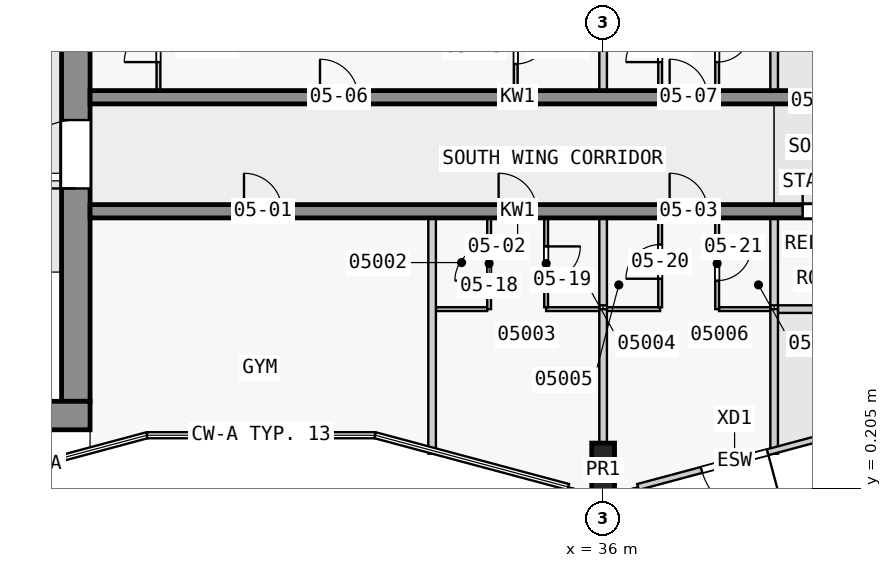
"""IFC4 building model, lengths in metres.
Left out: names, types, materials, properties, quantities, classifications, styles, units other than length and angle.
Written with IfcOpenShell. Run it as: python <this file> out.ifc"""

import sys

from ifc_helpers import new_model, si_unit, direction, frame, frame_2d, origin, origin_2d, place, context, subcontext, project, spatial, rectangle, extrude, element, fill, save


model = new_model("IFC4")
c1 = context("Model", 3, precision=1e-05, world=origin(), true_north=direction((0.0, 1.0)))
c2 = subcontext(c1, "Body", "Model", "MODEL_VIEW")
j1 = project(units=[si_unit("LENGTHUNIT", "METRE"), si_unit("PLANEANGLEUNIT", "RADIAN")], contexts=[c1])
p1 = place(None, origin())
s1 = spatial("IfcSite", under=j1, at=p1, CompositionType="ELEMENT")
p2 = place(p1, origin())
s2 = spatial("IfcBuilding", under=s1, at=p2, CompositionType="ELEMENT")
p3 = place(p2, frame((0.0, 0.0, 26.8)))
s3 = spatial("IfcBuildingStorey", under=s2, at=p3, CompositionType="ELEMENT", Elevation=26.8)
p4 = place(p3, frame((36.0, 0.7, 0.0), z_axis=(0.0, 0.0, 1.0), x_axis=(1.0, 0.0, 0.0)))
e1 = element("IfcColumn", 1, at=p4, inside=s3, PredefinedType="COLUMN", context=c2, shape_type="SweptSolid", body=[
    extrude(rectangle(XDim=0.6, YDim=1.4, at=origin_2d()), origin(), (0.0, 0.0, 1.0), 3.5),
])
p5 = place(p3, frame((1.55, 2.125, 0.0), z_axis=(0.0, 0.0, 1.0), x_axis=(1.0, 0.0, 0.0)))
e2 = element("IfcWall", 2, at=p5, inside=s3, PredefinedType="SHEAR", context=c2, shape_type="SweptSolid", body=[
    extrude(rectangle(XDim=20.95, YDim=0.75, at=frame_2d((10.475, 0.0))), origin(), (0.0, 0.0, 1.0), 3.25),
])
p6 = place(p3, frame((22.125, 2.5, 0.0), z_axis=(0.0, 0.0, 1.0), x_axis=(0.0, 1.0, 0.0)))
e3 = element("IfcWall", 3, at=p6, inside=s3, PredefinedType="SHEAR", context=c2, shape_type="SweptSolid", body=[
    extrude(rectangle(XDim=14.75, YDim=0.75, at=frame_2d((7.375, 0.0))), origin(), (0.0, 0.0, 1.0), 3.25),
])
p7 = place(p6, frame((5.6, 0.0, 0.0)))
e4 = element("IfcOpeningElement", 4, at=p7, cuts=e3, PredefinedType="OPENING", context=c2, shape_type="SweptSolid", body=[
    extrude(rectangle(XDim=1.8, YDim=2.1, at=frame_2d((0.9, 1.05))), frame((0.0, 0.385, 0.0), z_axis=(0.0, -1.0, 0.0), x_axis=(1.0, 0.0, 0.0)), (0.0, 0.0, 1.0), 0.77),
])
p8 = place(p3, frame((22.5, 7.5, 0.0), z_axis=(0.0, 0.0, 1.0), x_axis=(1.0, 0.0, 0.0)))
e5 = element("IfcWall", 5, at=p8, inside=s3, PredefinedType="SHEAR", context=c2, shape_type="SweptSolid", body=[
    extrude(rectangle(XDim=22.5, YDim=0.35, at=frame_2d((11.25, 0.0))), origin(), (0.0, 0.0, 1.0), 3.25),
])
p9 = place(p8, frame((4.05, 0.0, 0.0)))
e6 = element("IfcOpeningElement", 6, at=p9, cuts=e5, PredefinedType="OPENING", context=c2, shape_type="SweptSolid", body=[
    extrude(rectangle(XDim=1.0, YDim=2.1, at=frame_2d((0.5, 1.05))), frame((0.0, 0.185, 0.0), z_axis=(0.0, -1.0, 0.0), x_axis=(1.0, 0.0, 0.0)), (0.0, 0.0, 1.0), 0.37),
])
p10 = place(p8, frame((10.75, 0.0, 0.0)))
e7 = element("IfcOpeningElement", 7, at=p10, cuts=e5, PredefinedType="OPENING", context=c2, shape_type="SweptSolid", body=[
    extrude(rectangle(XDim=1.0, YDim=2.1, at=frame_2d((0.5, 1.05))), frame((0.0, 0.185, 0.0), z_axis=(0.0, -1.0, 0.0), x_axis=(1.0, 0.0, 0.0)), (0.0, 0.0, 1.0), 0.37),
])
p11 = place(p8, frame((15.25, 0.0, 0.0)))
e8 = element("IfcOpeningElement", 8, at=p11, cuts=e5, PredefinedType="OPENING", context=c2, shape_type="SweptSolid", body=[
    extrude(rectangle(XDim=1.0, YDim=2.1, at=frame_2d((0.5, 1.05))), frame((0.0, 0.185, 0.0), z_axis=(0.0, -1.0, 0.0), x_axis=(1.0, 0.0, 0.0)), (0.0, 0.0, 1.0), 0.37),
])
p12 = place(p8, frame((18.75, 0.0, 0.0)))
e9 = element("IfcOpeningElement", 9, at=p12, cuts=e5, PredefinedType="OPENING", context=c2, shape_type="SweptSolid", body=[
    extrude(rectangle(XDim=0.9, YDim=2.1, at=frame_2d((0.45, 1.05))), frame((0.0, 0.185, 0.0), z_axis=(0.0, -1.0, 0.0), x_axis=(1.0, 0.0, 0.0)), (0.0, 0.0, 1.0), 0.37),
])
p13 = place(p8, frame((20.95, 0.0, 0.0)))
e10 = element("IfcOpeningElement", 10, at=p13, cuts=e5, PredefinedType="OPENING", context=c2, shape_type="SweptSolid", body=[
    extrude(rectangle(XDim=1.0, YDim=2.1, at=frame_2d((0.5, 1.05))), frame((0.0, 0.185, 0.0), z_axis=(0.0, -1.0, 0.0), x_axis=(1.0, 0.0, 0.0)), (0.0, 0.0, 1.0), 0.37),
])
p14 = place(p3, frame((22.5, 10.5, 0.0), z_axis=(0.0, 0.0, 1.0), x_axis=(1.0, 0.0, 0.0)))
e11 = element("IfcWall", 11, at=p14, inside=s3, PredefinedType="SHEAR", context=c2, shape_type="SweptSolid", body=[
    extrude(rectangle(XDim=22.5, YDim=0.35, at=frame_2d((11.25, 0.0))), origin(), (0.0, 0.0, 1.0), 3.25),
])
p15 = place(p14, frame((6.05, 0.0, 0.0)))
e12 = element("IfcOpeningElement", 12, at=p15, cuts=e11, PredefinedType="OPENING", context=c2, shape_type="SweptSolid", body=[
    extrude(rectangle(XDim=1.0, YDim=2.1, at=frame_2d((0.5, 1.05))), frame((0.0, 0.185, 0.0), z_axis=(0.0, -1.0, 0.0), x_axis=(1.0, 0.0, 0.0)), (0.0, 0.0, 1.0), 0.37),
])
p16 = place(p14, frame((15.25, 0.0, 0.0)))
e13 = element("IfcOpeningElement", 13, at=p16, cuts=e11, PredefinedType="OPENING", context=c2, shape_type="SweptSolid", body=[
    extrude(rectangle(XDim=1.0, YDim=2.1, at=frame_2d((0.5, 1.05))), frame((0.0, 0.185, 0.0), z_axis=(0.0, -1.0, 0.0), x_axis=(1.0, 0.0, 0.0)), (0.0, 0.0, 1.0), 0.37),
])
p17 = place(p14, frame((19.75, 0.0, 0.0)))
e14 = element("IfcOpeningElement", 14, at=p17, cuts=e11, PredefinedType="OPENING", context=c2, shape_type="SweptSolid", body=[
    extrude(rectangle(XDim=1.0, YDim=2.1, at=frame_2d((0.5, 1.05))), frame((0.0, 0.185, 0.0), z_axis=(0.0, -1.0, 0.0), x_axis=(1.0, 0.0, 0.0)), (0.0, 0.0, 1.0), 0.37),
])
p18 = place(p3, frame((42.0, 1.607, 0.0), z_axis=(0.0, 0.0, 1.0), x_axis=(-0.965956335063, -0.258705157954, 0.0)))
e15 = element("IfcWall", 15, at=p18, inside=s3, PredefinedType="STANDARD", context=c2, shape_type="SweptSolid", body=[
    extrude(rectangle(XDim=5.261, YDim=0.16, at=frame_2d((2.631, 0.0))), origin(), (0.0, 0.0, 1.0), 3.25),
])
p19 = place(p18, frame((1.73, 0.0, 0.0)))
e16 = element("IfcOpeningElement", 16, at=p19, cuts=e15, PredefinedType="OPENING", context=c2, shape_type="SweptSolid", body=[
    extrude(rectangle(XDim=1.8, YDim=2.4, at=frame_2d((0.9, 1.2))), frame((0.0, 0.09, 0.0), z_axis=(0.0, -1.0, 0.0), x_axis=(1.0, 0.0, 0.0)), (0.0, 0.0, 1.0), 0.18),
])
p20 = place(p3, frame((31.6, 4.925, 0.0), z_axis=(0.0, 0.0, 1.0), x_axis=(1.0, 0.0, 0.0)))
e17 = element("IfcWall", 17, at=p20, inside=s3, PredefinedType="PARTITIONING", context=c2, shape_type="SweptSolid", body=[
    extrude(rectangle(XDim=1.35, YDim=0.1, at=frame_2d((0.675, 0.0))), origin(), (0.0, 0.0, 1.0), 3.25),
])
for number, where, z_axis, x_axis in (
    (18, (34.5, 4.925, 0.0), (0.0, 0.0, 1.0), (1.0, 0.0, 0.0)),
    (19, (36.1, 4.925, 0.0), (0.0, 0.0, 1.0), (1.0, 0.0, 0.0)),
):
    element("IfcWall", number, at=place(p3, frame(where, z_axis=z_axis, x_axis=x_axis)), inside=s3, PredefinedType="PARTITIONING", context=c2, shape_type="SweptSolid", body=[
        extrude(rectangle(XDim=1.4, YDim=0.1, at=frame_2d((0.7, 0.0))), origin(), (0.0, 0.0, 1.0), 3.25),
    ])
p21 = place(p3, frame((39.05, 4.925, 0.0), z_axis=(0.0, 0.0, 1.0), x_axis=(1.0, 0.0, 0.0)))
e20 = element("IfcWall", 20, at=p21, inside=s3, PredefinedType="PARTITIONING", context=c2, shape_type="SweptSolid", body=[
    extrude(rectangle(XDim=1.35, YDim=0.1, at=frame_2d((0.675, 0.0))), origin(), (0.0, 0.0, 1.0), 3.25),
])
p22 = place(p3, frame((40.6, 4.925, 0.0), z_axis=(0.0, 0.0, 1.0), x_axis=(1.0, 0.0, 0.0)))
e21 = element("IfcWall", 21, at=p22, inside=s3, PredefinedType="PARTITIONING", context=c2, shape_type="SweptSolid", body=[
    extrude(rectangle(XDim=2.3, YDim=0.2, at=frame_2d((1.15, 0.0))), origin(), (0.0, 0.0, 1.0), 3.25),
])
p23 = place(p3, frame((24.3, 10.675, 0.0), z_axis=(0.0, 0.0, 1.0), x_axis=(0.0, 1.0, 0.0)))
e22 = element("IfcWall", 22, at=p23, inside=s3, PredefinedType="PARTITIONING", context=c2, shape_type="SweptSolid", body=[
    extrude(rectangle(XDim=2.4, YDim=0.1, at=frame_2d((1.2, 0.0))), origin(), (0.0, 0.0, 1.0), 3.25),
])
p24 = place(p23, frame((0.75, 0.0, 0.0)))
e23 = element("IfcOpeningElement", 23, at=p24, cuts=e22, PredefinedType="OPENING", context=c2, shape_type="SweptSolid", body=[
    extrude(rectangle(XDim=0.9, YDim=2.1, at=frame_2d((0.45, 1.05))), frame((0.0, 0.06, 0.0), z_axis=(0.0, -1.0, 0.0), x_axis=(1.0, 0.0, 0.0)), (0.0, 0.0, 1.0), 0.12),
])
p25 = place(p3, frame((31.5, 1.122, 0.0), z_axis=(0.0, 0.0, 1.0), x_axis=(0.0, 1.0, 0.0)))
e24 = element("IfcWall", 24, at=p25, inside=s3, PredefinedType="PARTITIONING", context=c2, shape_type="SweptSolid", body=[
    extrude(rectangle(XDim=6.203, YDim=0.2, at=frame_2d((3.101, 0.0))), origin(), (0.0, 0.0, 1.0), 3.25),
])
p26 = place(p3, frame((33.0, 4.925, 0.0), z_axis=(0.0, 0.0, 1.0), x_axis=(0.0, 1.0, 0.0)))
e25 = element("IfcWall", 25, at=p26, inside=s3, PredefinedType="PARTITIONING", context=c2, shape_type="SweptSolid", body=[
    extrude(rectangle(XDim=2.4, YDim=0.1, at=frame_2d((1.2, 0.0))), origin(), (0.0, 0.0, 1.0), 3.25),
])
p27 = place(p26, frame((0.75, 0.0, 0.0)))
e26 = element("IfcOpeningElement", 26, at=p27, cuts=e25, PredefinedType="OPENING", context=c2, shape_type="SweptSolid", body=[
    extrude(rectangle(XDim=0.9, YDim=2.1, at=frame_2d((0.45, 1.05))), frame((0.0, 0.06, 0.0), z_axis=(0.0, -1.0, 0.0), x_axis=(1.0, 0.0, 0.0)), (0.0, 0.0, 1.0), 0.12),
])
p28 = place(p3, frame((33.7, 13.025, 0.0), z_axis=(0.0, 0.0, 1.0), x_axis=(0.0, -1.0, 0.0)))
e27 = element("IfcWall", 27, at=p28, inside=s3, PredefinedType="PARTITIONING", context=c2, shape_type="SweptSolid", body=[
    extrude(rectangle(XDim=2.35, YDim=0.1, at=frame_2d((1.175, 0.0))), origin(), (0.0, 0.0, 1.0), 3.25),
])
p29 = place(p28, frame((0.75, 0.0, 0.0)))
e28 = element("IfcOpeningElement", 28, at=p29, cuts=e27, PredefinedType="OPENING", context=c2, shape_type="SweptSolid", body=[
    extrude(rectangle(XDim=0.9, YDim=2.1, at=frame_2d((0.45, 1.05))), frame((0.0, 0.06, 0.0), z_axis=(0.0, -1.0, 0.0), x_axis=(1.0, 0.0, 0.0)), (0.0, 0.0, 1.0), 0.12),
])
p30 = place(p3, frame((34.5, 7.325, 0.0), z_axis=(0.0, 0.0, 1.0), x_axis=(0.0, -1.0, 0.0)))
e29 = element("IfcWall", 29, at=p30, inside=s3, PredefinedType="PARTITIONING", context=c2, shape_type="SweptSolid", body=[
    extrude(rectangle(XDim=2.35, YDim=0.1, at=frame_2d((1.175, 0.0))), origin(), (0.0, 0.0, 1.0), 3.25),
])
p31 = place(p30, frame((0.75, 0.0, 0.0)))
e30 = element("IfcOpeningElement", 30, at=p31, cuts=e29, PredefinedType="OPENING", context=c2, shape_type="SweptSolid", body=[
    extrude(rectangle(XDim=0.9, YDim=2.1, at=frame_2d((0.45, 1.05))), frame((0.0, 0.06, 0.0), z_axis=(0.0, -1.0, 0.0), x_axis=(1.0, 0.0, 0.0)), (0.0, 0.0, 1.0), 0.12),
])
p32 = place(p3, frame((36.0, 4.925, 0.0), z_axis=(0.0, 0.0, 1.0), x_axis=(0.0, -1.0, 0.0)))
e31 = element("IfcWall", 31, at=p32, inside=s3, PredefinedType="PARTITIONING", context=c2, shape_type="SweptSolid", body=[
    extrude(rectangle(XDim=3.525, YDim=0.2, at=frame_2d((1.763, 0.0))), origin(), (0.0, 0.0, 1.0), 3.25),
])
p33 = place(p3, frame((36.0, 5.025, 0.0), z_axis=(0.0, 0.0, 1.0), x_axis=(0.0, 1.0, 0.0)))
e32 = element("IfcWall", 32, at=p33, inside=s3, PredefinedType="PARTITIONING", context=c2, shape_type="SweptSolid", body=[
    extrude(rectangle(XDim=2.3, YDim=0.2, at=frame_2d((1.15, 0.0))), origin(), (0.0, 0.0, 1.0), 3.25),
])
p34 = place(p3, frame((36.0, 10.675, 0.0), z_axis=(0.0, 0.0, 1.0), x_axis=(0.0, 1.0, 0.0)))
e33 = element("IfcWall", 33, at=p34, inside=s3, PredefinedType="PARTITIONING", context=c2, shape_type="SweptSolid", body=[
    extrude(rectangle(XDim=5.925, YDim=0.2, at=frame_2d((2.962, 0.0))), origin(), (0.0, 0.0, 1.0), 3.25),
])
p35 = place(p3, frame((37.5, 4.975, 0.0), z_axis=(0.0, 0.0, 1.0), x_axis=(0.0, 1.0, 0.0)))
e34 = element("IfcWall", 34, at=p35, inside=s3, PredefinedType="PARTITIONING", context=c2, shape_type="SweptSolid", body=[
    extrude(rectangle(XDim=2.35, YDim=0.1, at=frame_2d((1.175, 0.0))), origin(), (0.0, 0.0, 1.0), 3.25),
])
p36 = place(p35, frame((0.75, 0.0, 0.0)))
e35 = element("IfcOpeningElement", 35, at=p36, cuts=e34, PredefinedType="OPENING", context=c2, shape_type="SweptSolid", body=[
    extrude(rectangle(XDim=0.9, YDim=2.1, at=frame_2d((0.45, 1.05))), frame((0.0, 0.06, 0.0), z_axis=(0.0, -1.0, 0.0), x_axis=(1.0, 0.0, 0.0)), (0.0, 0.0, 1.0), 0.12),
])
p37 = place(p3, frame((37.5, 10.675, 0.0), z_axis=(0.0, 0.0, 1.0), x_axis=(0.0, 1.0, 0.0)))
e36 = element("IfcWall", 36, at=p37, inside=s3, PredefinedType="PARTITIONING", context=c2, shape_type="SweptSolid", body=[
    extrude(rectangle(XDim=2.35, YDim=0.1, at=frame_2d((1.175, 0.0))), origin(), (0.0, 0.0, 1.0), 3.25),
])
p38 = place(p37, frame((0.75, 0.0, 0.0)))
e37 = element("IfcOpeningElement", 37, at=p38, cuts=e36, PredefinedType="OPENING", context=c2, shape_type="SweptSolid", body=[
    extrude(rectangle(XDim=0.9, YDim=2.1, at=frame_2d((0.45, 1.05))), frame((0.0, 0.06, 0.0), z_axis=(0.0, -1.0, 0.0), x_axis=(1.0, 0.0, 0.0)), (0.0, 0.0, 1.0), 0.12),
])
p39 = place(p3, frame((39.0, 7.325, 0.0), z_axis=(0.0, 0.0, 1.0), x_axis=(0.0, -1.0, 0.0)))
e38 = element("IfcWall", 38, at=p39, inside=s3, PredefinedType="PARTITIONING", context=c2, shape_type="SweptSolid", body=[
    extrude(rectangle(XDim=2.4, YDim=0.1, at=frame_2d((1.2, 0.0))), origin(), (0.0, 0.0, 1.0), 3.25),
])
p40 = place(p39, frame((0.75, 0.0, 0.0)))
e39 = element("IfcOpeningElement", 39, at=p40, cuts=e38, PredefinedType="OPENING", context=c2, shape_type="SweptSolid", body=[
    extrude(rectangle(XDim=0.9, YDim=2.1, at=frame_2d((0.45, 1.05))), frame((0.0, 0.06, 0.0), z_axis=(0.0, -1.0, 0.0), x_axis=(1.0, 0.0, 0.0)), (0.0, 0.0, 1.0), 0.12),
])
p41 = place(p3, frame((39.0, 13.075, 0.0), z_axis=(0.0, 0.0, 1.0), x_axis=(0.0, -1.0, 0.0)))
e40 = element("IfcWall", 40, at=p41, inside=s3, PredefinedType="PARTITIONING", context=c2, shape_type="SweptSolid", body=[
    extrude(rectangle(XDim=2.4, YDim=0.1, at=frame_2d((1.2, 0.0))), origin(), (0.0, 0.0, 1.0), 3.25),
])
p42 = place(p41, frame((0.75, 0.0, 0.0)))
e41 = element("IfcOpeningElement", 41, at=p42, cuts=e40, PredefinedType="OPENING", context=c2, shape_type="SweptSolid", body=[
    extrude(rectangle(XDim=0.9, YDim=2.1, at=frame_2d((0.45, 1.05))), frame((0.0, 0.06, 0.0), z_axis=(0.0, -1.0, 0.0), x_axis=(1.0, 0.0, 0.0)), (0.0, 0.0, 1.0), 0.12),
])
p43 = place(p3, frame((40.5, 4.925, 0.0), z_axis=(0.0, 0.0, 1.0), x_axis=(0.0, -1.0, 0.0)))
e42 = element("IfcWall", 42, at=p43, inside=s3, PredefinedType="PARTITIONING", context=c2, shape_type="SweptSolid", body=[
    extrude(rectangle(XDim=3.803, YDim=0.2, at=frame_2d((1.901, 0.0))), origin(), (0.0, 0.0, 1.0), 3.25),
])
for number, where, z_axis, x_axis in (
    (43, (40.5, 5.025, 0.0), (0.0, 0.0, 1.0), (0.0, 1.0, 0.0)),
    (44, (40.5, 10.675, 0.0), (0.0, 0.0, 1.0), (0.0, 1.0, 0.0)),
):
    element("IfcWall", number, at=place(p3, frame(where, z_axis=z_axis, x_axis=x_axis)), inside=s3, PredefinedType="PARTITIONING", context=c2, shape_type="SweptSolid", body=[
        extrude(rectangle(XDim=2.3, YDim=0.2, at=frame_2d((1.15, 0.0))), origin(), (0.0, 0.0, 1.0), 3.25),
    ])
p44 = place(p19, origin())
e45 = element("IfcDoor", 45, at=p44, inside=s3, OperationType="SINGLE_SWING_LEFT", PredefinedType="DOOR", context=c2, shape_type="SweptSolid", body=[
    extrude(rectangle(XDim=1.8, YDim=2.4, at=frame_2d((0.9, 1.2))), frame((0.0, 0.025, 0.0), z_axis=(0.0, -1.0, 0.0), x_axis=(1.0, 0.0, 0.0)), (0.0, 0.0, 1.0), 0.05),
])
fill(e16, e45)
p45 = place(p7, origin())
e46 = element("IfcDoor", 46, at=p45, inside=s3, OperationType="DOUBLE_DOOR_SINGLE_SWING", PredefinedType="DOOR", context=c2, shape_type="SweptSolid", body=[
    extrude(rectangle(XDim=1.8, YDim=2.1, at=frame_2d((0.9, 1.05))), frame((0.0, 0.025, 0.0), z_axis=(0.0, -1.0, 0.0), x_axis=(1.0, 0.0, 0.0)), (0.0, 0.0, 1.0), 0.05),
])
fill(e4, e46)
p46 = place(p9, origin())
e47 = element("IfcDoor", 47, at=p46, inside=s3, OperationType="SINGLE_SWING_LEFT", PredefinedType="DOOR", context=c2, shape_type="SweptSolid", body=[
    extrude(rectangle(XDim=1.0, YDim=2.1, at=frame_2d((0.5, 1.05))), frame((0.0, 0.025, 0.0), z_axis=(0.0, -1.0, 0.0), x_axis=(1.0, 0.0, 0.0)), (0.0, 0.0, 1.0), 0.05),
])
fill(e6, e47)
p47 = place(p10, origin())
e48 = element("IfcDoor", 48, at=p47, inside=s3, OperationType="SINGLE_SWING_LEFT", PredefinedType="DOOR", context=c2, shape_type="SweptSolid", body=[
    extrude(rectangle(XDim=1.0, YDim=2.1, at=frame_2d((0.5, 1.05))), frame((0.0, 0.025, 0.0), z_axis=(0.0, -1.0, 0.0), x_axis=(1.0, 0.0, 0.0)), (0.0, 0.0, 1.0), 0.05),
])
fill(e7, e48)
p48 = place(p11, origin())
e49 = element("IfcDoor", 49, at=p48, inside=s3, OperationType="SINGLE_SWING_RIGHT", PredefinedType="DOOR", context=c2, shape_type="SweptSolid", body=[
    extrude(rectangle(XDim=1.0, YDim=2.1, at=frame_2d((0.5, 1.05))), frame((0.0, 0.025, 0.0), z_axis=(0.0, -1.0, 0.0), x_axis=(1.0, 0.0, 0.0)), (0.0, 0.0, 1.0), 0.05),
])
fill(e8, e49)
p49 = place(p12, origin())
e50 = element("IfcDoor", 50, at=p49, inside=s3, OperationType="SINGLE_SWING_RIGHT", PredefinedType="DOOR", context=c2, shape_type="SweptSolid", body=[
    extrude(rectangle(XDim=0.9, YDim=2.1, at=frame_2d((0.45, 1.05))), frame((0.0, 0.025, 0.0), z_axis=(0.0, -1.0, 0.0), x_axis=(1.0, 0.0, 0.0)), (0.0, 0.0, 1.0), 0.05),
])
fill(e9, e50)
p50 = place(p15, origin())
e51 = element("IfcDoor", 51, at=p50, inside=s3, OperationType="SINGLE_SWING_LEFT", PredefinedType="DOOR", context=c2, shape_type="SweptSolid", body=[
    extrude(rectangle(XDim=1.0, YDim=2.1, at=frame_2d((0.5, 1.05))), frame((0.0, 0.025, 0.0), z_axis=(0.0, -1.0, 0.0), x_axis=(1.0, 0.0, 0.0)), (0.0, 0.0, 1.0), 0.05),
])
fill(e12, e51)
p51 = place(p16, origin())
e52 = element("IfcDoor", 52, at=p51, inside=s3, OperationType="SINGLE_SWING_RIGHT", PredefinedType="DOOR", context=c2, shape_type="SweptSolid", body=[
    extrude(rectangle(XDim=1.0, YDim=2.1, at=frame_2d((0.5, 1.05))), frame((0.0, 0.025, 0.0), z_axis=(0.0, -1.0, 0.0), x_axis=(1.0, 0.0, 0.0)), (0.0, 0.0, 1.0), 0.05),
])
fill(e13, e52)
p52 = place(p27, origin())
e53 = element("IfcDoor", 53, at=p52, inside=s3, OperationType="SINGLE_SWING_LEFT", PredefinedType="DOOR", context=c2, shape_type="SweptSolid", body=[
    extrude(rectangle(XDim=0.9, YDim=2.1, at=frame_2d((0.45, 1.05))), frame((0.0, 0.025, 0.0), z_axis=(0.0, -1.0, 0.0), x_axis=(1.0, 0.0, 0.0)), (0.0, 0.0, 1.0), 0.05),
])
fill(e26, e53)
p53 = place(p31, origin())
e54 = element("IfcDoor", 54, at=p53, inside=s3, OperationType="SINGLE_SWING_RIGHT", PredefinedType="DOOR", context=c2, shape_type="SweptSolid", body=[
    extrude(rectangle(XDim=0.9, YDim=2.1, at=frame_2d((0.45, 1.05))), frame((0.0, 0.025, 0.0), z_axis=(0.0, -1.0, 0.0), x_axis=(1.0, 0.0, 0.0)), (0.0, 0.0, 1.0), 0.05),
])
fill(e30, e54)
p54 = place(p36, origin())
e55 = element("IfcDoor", 55, at=p54, inside=s3, OperationType="SINGLE_SWING_RIGHT", PredefinedType="DOOR", context=c2, shape_type="SweptSolid", body=[
    extrude(rectangle(XDim=0.9, YDim=2.1, at=frame_2d((0.45, 1.05))), frame((0.0, 0.025, 0.0), z_axis=(0.0, -1.0, 0.0), x_axis=(1.0, 0.0, 0.0)), (0.0, 0.0, 1.0), 0.05),
])
fill(e35, e55)
p55 = place(p40, origin())
e56 = element("IfcDoor", 56, at=p55, inside=s3, OperationType="SINGLE_SWING_LEFT", PredefinedType="DOOR", context=c2, shape_type="SweptSolid", body=[
    extrude(rectangle(XDim=0.9, YDim=2.1, at=frame_2d((0.45, 1.05))), frame((0.0, 0.025, 0.0), z_axis=(0.0, -1.0, 0.0), x_axis=(1.0, 0.0, 0.0)), (0.0, 0.0, 1.0), 0.05),
])
fill(e39, e56)
p56 = place(p24, origin())
e57 = element("IfcDoor", 57, at=p56, inside=s3, OperationType="SINGLE_SWING_RIGHT", PredefinedType="DOOR", context=c2, shape_type="SweptSolid", body=[
    extrude(rectangle(XDim=0.9, YDim=2.1, at=frame_2d((0.45, 1.05))), frame((0.0, 0.025, 0.0), z_axis=(0.0, -1.0, 0.0), x_axis=(1.0, 0.0, 0.0)), (0.0, 0.0, 1.0), 0.05),
])
fill(e23, e57)
p57 = place(p29, origin())
e58 = element("IfcDoor", 58, at=p57, inside=s3, OperationType="SINGLE_SWING_RIGHT", PredefinedType="DOOR", context=c2, shape_type="SweptSolid", body=[
    extrude(rectangle(XDim=0.9, YDim=2.1, at=frame_2d((0.45, 1.05))), frame((0.0, 0.025, 0.0), z_axis=(0.0, -1.0, 0.0), x_axis=(1.0, 0.0, 0.0)), (0.0, 0.0, 1.0), 0.05),
])
fill(e28, e58)
p58 = place(p38, origin())
e59 = element("IfcDoor", 59, at=p58, inside=s3, OperationType="SINGLE_SWING_RIGHT", PredefinedType="DOOR", context=c2, shape_type="SweptSolid", body=[
    extrude(rectangle(XDim=0.9, YDim=2.1, at=frame_2d((0.45, 1.05))), frame((0.0, 0.025, 0.0), z_axis=(0.0, -1.0, 0.0), x_axis=(1.0, 0.0, 0.0)), (0.0, 0.0, 1.0), 0.05),
])
fill(e37, e59)
p59 = place(p42, origin())
e60 = element("IfcDoor", 60, at=p59, inside=s3, OperationType="SINGLE_SWING_RIGHT", PredefinedType="DOOR", context=c2, shape_type="SweptSolid", body=[
    extrude(rectangle(XDim=0.9, YDim=2.1, at=frame_2d((0.45, 1.05))), frame((0.0, 0.025, 0.0), z_axis=(0.0, -1.0, 0.0), x_axis=(1.0, 0.0, 0.0)), (0.0, 0.0, 1.0), 0.05),
])
fill(e41, e60)
save(model, sys.argv[1])
